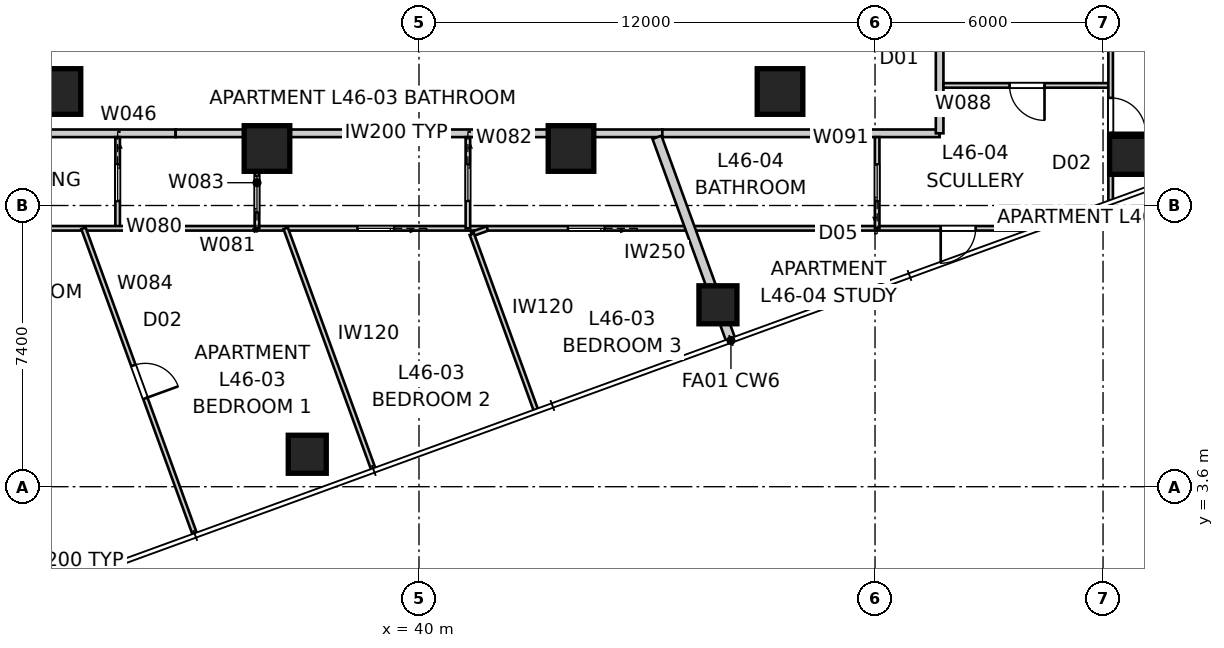
"""IFC4 building model, lengths in metres.
Left out: names, types, materials, properties, quantities, classifications, styles, units other than length and angle.
Written with IfcOpenShell. Run it as: python <this file> out.ifc"""

import sys

from ifc_helpers import new_model, si_unit, direction, frame, frame_2d, origin, origin_2d, place, context, subcontext, project, spatial, rectangle, extrude, element, fill, save


model = new_model("IFC4")
c1 = context("Model", 3, precision=1e-05, world=origin(), true_north=direction((0.0, 1.0)))
c2 = subcontext(c1, "Body", "Model", "MODEL_VIEW")
j1 = project(units=[si_unit("LENGTHUNIT", "METRE"), si_unit("PLANEANGLEUNIT", "RADIAN")], contexts=[c1])
p1 = place(None, origin())
s1 = spatial("IfcSite", under=j1, at=p1, CompositionType="ELEMENT")
p2 = place(p1, origin())
s2 = spatial("IfcBuilding", under=s1, at=p2, CompositionType="ELEMENT")
p3 = place(p2, frame((0.0, 0.0, 167.6)))
s3 = spatial("IfcBuildingStorey", under=s2, at=p3, CompositionType="ELEMENT", Elevation=167.6)
for number, where, z_axis, x_axis in (
    (1, (37.06, 4.454, 0.0), (0.0, 0.0, 1.0), (1.0, 0.0, 0.0)),
    (2, (47.866, 8.387, 0.0), (0.0, 0.0, 1.0), (1.0, 0.0, 0.0)),
    (3, (58.673, 12.32, 0.0), (0.0, 0.0, 1.0), (1.0, 0.0, 0.0)),
):
    element("IfcColumn", number, at=place(p3, frame(where, z_axis=z_axis, x_axis=x_axis)), inside=s3, PredefinedType="COLUMN", context=c2, shape_type="SweptSolid", body=[
        extrude(rectangle(XDim=1.0, YDim=1.0, at=origin_2d()), origin(), (0.0, 0.0, 1.0), 3.2),
    ])
for number, where, z_axis, x_axis in (
    (4, (30.5, 14.0, 0.0), (0.0, 0.0, 1.0), (1.0, 0.0, 0.0)),
    (5, (36.0, 12.5, 0.0), (0.0, 0.0, 1.0), (1.0, 0.0, 0.0)),
    (6, (44.0, 12.5, 0.0), (0.0, 0.0, 1.0), (1.0, 0.0, 0.0)),
    (7, (49.5, 14.0, 0.0), (0.0, 0.0, 1.0), (1.0, 0.0, 0.0)),
):
    element("IfcColumn", number, at=place(p3, frame(where, z_axis=z_axis, x_axis=x_axis)), inside=s3, PredefinedType="COLUMN", context=c2, shape_type="SweptSolid", body=[
        extrude(rectangle(XDim=1.2, YDim=1.2, at=origin_2d()), origin(), (0.0, 0.0, 1.0), 3.4),
    ])
p4 = place(p3, frame((25.5, 12.9, 0.0), z_axis=(0.0, 0.0, 1.0), x_axis=(1.0, 0.0, 0.0)))
e8 = element("IfcWall", 8, at=p4, inside=s3, PredefinedType="PARTITIONING", context=c2, shape_type="SweptSolid", body=[
    extrude(rectangle(XDim=8.097, YDim=0.2, at=frame_2d((4.048, 0.0))), origin(), (0.0, 0.0, 1.0), 3.2),
])
p5 = place(p4, frame((2.95, 0.0, 0.0)))
e9 = element("IfcOpeningElement", 9, at=p5, cuts=e8, PredefinedType="OPENING", context=c2, shape_type="SweptSolid", body=[
    extrude(rectangle(XDim=1.02, YDim=2.34, at=frame_2d((0.51, 1.17))), frame((0.0, 0.11, 0.0), z_axis=(0.0, -1.0, 0.0), x_axis=(1.0, 0.0, 0.0)), (0.0, 0.0, 1.0), 0.22),
])
p6 = place(p3, frame((33.597, 12.9, 0.0), z_axis=(0.0, 0.0, 1.0), x_axis=(1.0, 0.0, 0.0)))
e10 = element("IfcWall", 10, at=p6, inside=s3, PredefinedType="PARTITIONING", context=c2, shape_type="SweptSolid", body=[
    extrude(rectangle(XDim=1.873, YDim=0.2, at=frame_2d((0.937, 0.0))), origin(), (0.0, 0.0, 1.0), 2.2),
])
p7 = place(p3, frame((35.47, 12.9, 0.0), z_axis=(0.0, 0.0, 1.0), x_axis=(1.0, 0.0, 0.0)))
e11 = element("IfcWall", 11, at=p7, inside=s3, PredefinedType="PARTITIONING", context=c2, shape_type="SweptSolid", body=[
    extrude(rectangle(XDim=9.06, YDim=0.2, at=frame_2d((4.53, 0.0))), origin(), (0.0, 0.0, 1.0), 3.2),
])
p8 = place(p3, frame((44.53, 12.9, 0.0), z_axis=(0.0, 0.0, 1.0), x_axis=(1.0, 0.0, 0.0)))
e12 = element("IfcWall", 12, at=p8, inside=s3, PredefinedType="PARTITIONING", context=c2, shape_type="SweptSolid", body=[
    extrude(rectangle(XDim=1.873, YDim=0.2, at=frame_2d((0.937, 0.0))), origin(), (0.0, 0.0, 1.0), 2.2),
])
p9 = place(p3, frame((46.403, 12.9, 0.0), z_axis=(0.0, 0.0, 1.0), x_axis=(1.0, 0.0, 0.0)))
e13 = element("IfcWall", 13, at=p9, inside=s3, PredefinedType="PARTITIONING", context=c2, shape_type="SweptSolid", body=[
    extrude(rectangle(XDim=7.297, YDim=0.2, at=frame_2d((3.648, 0.0))), origin(), (0.0, 0.0, 1.0), 3.2),
])
p10 = place(p3, frame((53.7, 12.9, 0.0), z_axis=(0.0, 0.0, 1.0), x_axis=(0.0, 1.0, 0.0)))
e14 = element("IfcWall", 14, at=p10, inside=s3, PredefinedType="PARTITIONING", context=c2, shape_type="SweptSolid", body=[
    extrude(rectangle(XDim=33.8, YDim=0.2, at=frame_2d((16.9, 0.0))), origin(), (0.0, 0.0, 1.0), 3.2),
])
p11 = place(p10, frame((29.25, 0.0, 0.0)))
e15 = element("IfcOpeningElement", 15, at=p11, cuts=e14, PredefinedType="OPENING", context=c2, shape_type="SweptSolid", body=[
    extrude(rectangle(XDim=1.02, YDim=2.0, at=frame_2d((0.51, 1.0))), frame((0.0, 0.11, 0.0), z_axis=(0.0, -1.0, 0.0), x_axis=(1.0, 0.0, 0.0)), (0.0, 0.0, 1.0), 0.22),
])
p12 = place(p10, frame((2.87, 0.0, 0.0)))
e16 = element("IfcOpeningElement", 16, at=p12, cuts=e14, PredefinedType="OPENING", context=c2, shape_type="SweptSolid", body=[
    extrude(rectangle(XDim=1.02, YDim=2.34, at=frame_2d((0.51, 1.17))), frame((0.0, 0.11, 0.0), z_axis=(0.0, -1.0, 0.0), x_axis=(1.0, 0.0, 0.0)), (0.0, 0.0, 1.0), 0.22),
])
p13 = place(p3, frame((48.208, 7.447, 0.0), z_axis=(0.0, 0.0, 1.0), x_axis=(-0.342004838392, 0.939698191185, 0.0)))
e17 = element("IfcWall", 17, at=p13, inside=s3, PredefinedType="PARTITIONING", context=c2, shape_type="SweptSolid", body=[
    extrude(rectangle(XDim=5.691, YDim=0.25, at=frame_2d((2.845, 0.0))), origin(), (0.0, 0.0, 1.0), 3.2),
])
p14 = place(p3, frame((32.071, 12.8, 0.0), z_axis=(0.0, 0.0, 1.0), x_axis=(0.0, -1.0, 0.0)))
e18 = element("IfcWall", 18, at=p14, inside=s3, PredefinedType="PARTITIONING", context=c2, shape_type="SweptSolid", body=[
    extrude(rectangle(XDim=2.4, YDim=0.12, at=frame_2d((1.2, 0.0))), origin(), (0.0, 0.0, 1.0), 3.2),
])
p15 = place(p14, frame((0.72, 0.0, 0.0)))
e19 = element("IfcOpeningElement", 19, at=p15, cuts=e18, PredefinedType="OPENING", context=c2, shape_type="SweptSolid", body=[
    extrude(rectangle(XDim=0.96, YDim=2.1, at=frame_2d((0.48, 1.05))), frame((0.0, 0.07, 0.0), z_axis=(0.0, -1.0, 0.0), x_axis=(1.0, 0.0, 0.0)), (0.0, 0.0, 1.0), 0.14),
])
p16 = place(p3, frame((56.281, 10.4, 0.0), z_axis=(0.0, 0.0, 1.0), x_axis=(-1.0, 0.0, 0.0)))
e20 = element("IfcWall", 20, at=p16, inside=s3, PredefinedType="PARTITIONING", context=c2, shape_type="SweptSolid", body=[
    extrude(rectangle(XDim=34.647, YDim=0.12, at=frame_2d((17.324, 0.0))), origin(), (0.0, 0.0, 1.0), 3.2),
])
p17 = place(p16, frame((29.309, 0.0, 0.0)))
e21 = element("IfcOpeningElement", 21, at=p17, cuts=e20, PredefinedType="OPENING", context=c2, shape_type="SweptSolid", body=[
    extrude(rectangle(XDim=0.92, YDim=2.34, at=frame_2d((0.46, 1.17))), frame((0.0, 0.07, 0.0), z_axis=(0.0, -1.0, 0.0), x_axis=(1.0, 0.0, 0.0)), (0.0, 0.0, 1.0), 0.14),
])
p18 = place(p16, frame((1.632, 0.0, 0.0)))
e22 = element("IfcOpeningElement", 22, at=p18, cuts=e20, PredefinedType="OPENING", context=c2, shape_type="SweptSolid", body=[
    extrude(rectangle(XDim=0.92, YDim=2.1, at=frame_2d((0.46, 1.05))), frame((0.0, 0.07, 0.0), z_axis=(0.0, -1.0, 0.0), x_axis=(1.0, 0.0, 0.0)), (0.0, 0.0, 1.0), 0.14),
])
p19 = place(p16, frame((16.938, 0.0, 0.0)))
e23 = element("IfcOpeningElement", 23, at=p19, cuts=e20, PredefinedType="OPENING", context=c2, shape_type="SweptSolid", body=[
    extrude(rectangle(XDim=0.96, YDim=2.1, at=frame_2d((0.48, 1.05))), frame((0.0, 0.07, 0.0), z_axis=(0.0, -1.0, 0.0), x_axis=(1.0, 0.0, 0.0)), (0.0, 0.0, 1.0), 0.14),
])
p20 = place(p16, frame((11.4, 0.0, 0.0)))
e24 = element("IfcOpeningElement", 24, at=p20, cuts=e20, PredefinedType="OPENING", context=c2, shape_type="SweptSolid", body=[
    extrude(rectangle(XDim=0.96, YDim=2.1, at=frame_2d((0.48, 1.05))), frame((0.0, 0.07, 0.0), z_axis=(0.0, -1.0, 0.0), x_axis=(1.0, 0.0, 0.0)), (0.0, 0.0, 1.0), 0.14),
])
p21 = place(p3, frame((41.287, 12.8, 0.0), z_axis=(0.0, 0.0, 1.0), x_axis=(0.0, -1.0, 0.0)))
e25 = element("IfcWall", 25, at=p21, inside=s3, PredefinedType="PARTITIONING", context=c2, shape_type="SweptSolid", body=[
    extrude(rectangle(XDim=2.4, YDim=0.12, at=frame_2d((1.2, 0.0))), origin(), (0.0, 0.0, 1.0), 3.2),
])
p22 = place(p21, frame((0.72, 0.0, 0.0)))
e26 = element("IfcOpeningElement", 26, at=p22, cuts=e25, PredefinedType="OPENING", context=c2, shape_type="SweptSolid", body=[
    extrude(rectangle(XDim=0.96, YDim=2.1, at=frame_2d((0.48, 1.05))), frame((0.0, 0.07, 0.0), z_axis=(0.0, -1.0, 0.0), x_axis=(1.0, 0.0, 0.0)), (0.0, 0.0, 1.0), 0.14),
])
p23 = place(p3, frame((35.737, 10.4, 0.0), z_axis=(0.0, 0.0, 1.0), x_axis=(0.0, 1.0, 0.0)))
e27 = element("IfcWall", 27, at=p23, inside=s3, PredefinedType="PARTITIONING", context=c2, shape_type="SweptSolid", body=[
    extrude(rectangle(XDim=2.4, YDim=0.12, at=frame_2d((1.2, 0.0))), origin(), (0.0, 0.0, 1.0), 3.2),
])
p24 = place(p23, frame((0.42, 0.0, 0.0)))
e28 = element("IfcOpeningElement", 28, at=p24, cuts=e27, PredefinedType="OPENING", context=c2, shape_type="SweptSolid", body=[
    extrude(rectangle(XDim=0.96, YDim=2.1, at=frame_2d((0.48, 1.05))), frame((0.0, 0.07, 0.0), z_axis=(0.0, -1.0, 0.0), x_axis=(1.0, 0.0, 0.0)), (0.0, 0.0, 1.0), 0.14),
])
p25 = place(p3, frame((31.171, 10.4, 0.0), z_axis=(0.0, 0.0, 1.0), x_axis=(0.34202238111, -0.939691806296, 0.0)))
e29 = element("IfcWall", 29, at=p25, inside=s3, PredefinedType="PARTITIONING", context=c2, shape_type="SweptSolid", body=[
    extrude(rectangle(XDim=8.562, YDim=0.12, at=frame_2d((4.281, 0.0))), origin(), (0.0, 0.0, 1.0), 3.2),
])
p26 = place(p25, frame((3.841, 0.0, 0.0)))
e30 = element("IfcOpeningElement", 30, at=p26, cuts=e29, PredefinedType="OPENING", context=c2, shape_type="SweptSolid", body=[
    extrude(rectangle(XDim=0.92, YDim=2.34, at=frame_2d((0.46, 1.17))), frame((0.0, 0.07, 0.0), z_axis=(0.0, -1.0, 0.0), x_axis=(1.0, 0.0, 0.0)), (0.0, 0.0, 1.0), 0.14),
])
p27 = place(p3, frame((36.492, 10.4, 0.0), z_axis=(0.0, 0.0, 1.0), x_axis=(0.342030900012, -0.939688705602, 0.0)))
e31 = element("IfcWall", 31, at=p27, inside=s3, PredefinedType="PARTITIONING", context=c2, shape_type="SweptSolid", body=[
    extrude(rectangle(XDim=6.742, YDim=0.12, at=frame_2d((3.371, 0.0))), origin(), (0.0, 0.0, 1.0), 2.588),
])
p28 = place(p3, frame((41.799, 10.395, 0.0), z_axis=(0.0, 0.0, 1.0), x_axis=(-0.939678576029, -0.342058728513, 0.0)))
e32 = element("IfcWall", 32, at=p28, inside=s3, PredefinedType="PARTITIONING", context=c2, shape_type="SweptSolid", body=[
    extrude(rectangle(XDim=0.435, YDim=0.12, at=frame_2d((0.217, 0.0))), origin(), (0.0, 0.0, 1.0), 3.2),
])
p29 = place(p3, frame((41.39, 10.246, 0.0), z_axis=(0.0, 0.0, 1.0), x_axis=(0.342017860496, -0.939693451665, 0.0)))
e33 = element("IfcWall", 33, at=p29, inside=s3, PredefinedType="PARTITIONING", context=c2, shape_type="SweptSolid", body=[
    extrude(rectangle(XDim=4.922, YDim=0.12, at=frame_2d((2.461, 0.0))), origin(), (0.0, 0.0, 1.0), 3.2),
])
p30 = place(p3, frame((58.2, 14.16, 0.0), z_axis=(0.0, 0.0, 1.0), x_axis=(-1.0, 0.0, 0.0)))
e34 = element("IfcWall", 34, at=p30, inside=s3, PredefinedType="PARTITIONING", context=c2, shape_type="SweptSolid", body=[
    extrude(rectangle(XDim=4.4, YDim=0.12, at=frame_2d((2.2, 0.0))), origin(), (0.0, 0.0, 1.0), 3.2),
])
p31 = place(p30, frame((1.74, 0.0, 0.0)))
e35 = element("IfcOpeningElement", 35, at=p31, cuts=e34, PredefinedType="OPENING", context=c2, shape_type="SweptSolid", body=[
    extrude(rectangle(XDim=0.92, YDim=2.34, at=frame_2d((0.46, 1.17))), frame((0.0, 0.07, 0.0), z_axis=(0.0, -1.0, 0.0), x_axis=(1.0, 0.0, 0.0)), (0.0, 0.0, 1.0), 0.14),
])
p32 = place(p3, frame((58.2, 47.266, 0.0), z_axis=(0.0, 0.0, 1.0), x_axis=(0.0, -1.0, 0.0)))
e36 = element("IfcWall", 36, at=p32, inside=s3, PredefinedType="PARTITIONING", context=c2, shape_type="SweptSolid", body=[
    extrude(rectangle(XDim=36.14, YDim=0.12, at=frame_2d((18.07, 0.0))), origin(), (0.0, 0.0, 1.0), 3.2),
])
p33 = place(p32, frame((2.227, 0.0, 0.0)))
e37 = element("IfcOpeningElement", 37, at=p33, cuts=e36, PredefinedType="OPENING", context=c2, shape_type="SweptSolid", body=[
    extrude(rectangle(XDim=0.92, YDim=2.34, at=frame_2d((0.46, 1.17))), frame((0.0, 0.07, 0.0), z_axis=(0.0, -1.0, 0.0), x_axis=(1.0, 0.0, 0.0)), (0.0, 0.0, 1.0), 0.14),
])
p34 = place(p32, frame((5.95, 0.0, 0.0)))
e38 = element("IfcOpeningElement", 38, at=p34, cuts=e36, PredefinedType="OPENING", context=c2, shape_type="SweptSolid", body=[
    extrude(rectangle(XDim=0.92, YDim=2.34, at=frame_2d((0.46, 1.17))), frame((0.0, 0.07, 0.0), z_axis=(0.0, -1.0, 0.0), x_axis=(1.0, 0.0, 0.0)), (0.0, 0.0, 1.0), 0.14),
])
p35 = place(p32, frame((29.769, 0.0, 0.0)))
e39 = element("IfcOpeningElement", 39, at=p35, cuts=e36, PredefinedType="OPENING", context=c2, shape_type="SweptSolid", body=[
    extrude(rectangle(XDim=0.92, YDim=2.34, at=frame_2d((0.46, 1.17))), frame((0.0, 0.07, 0.0), z_axis=(0.0, -1.0, 0.0), x_axis=(1.0, 0.0, 0.0)), (0.0, 0.0, 1.0), 0.14),
])
p36 = place(p32, frame((14.168, 0.0, 0.0)))
e40 = element("IfcOpeningElement", 40, at=p36, cuts=e36, PredefinedType="OPENING", context=c2, shape_type="SweptSolid", body=[
    extrude(rectangle(XDim=0.92, YDim=2.34, at=frame_2d((0.46, 1.17))), frame((0.0, 0.07, 0.0), z_axis=(0.0, -1.0, 0.0), x_axis=(1.0, 0.0, 0.0)), (0.0, 0.0, 1.0), 0.14),
])
p37 = place(p32, frame((33.434, 0.0, 0.0)))
e41 = element("IfcOpeningElement", 41, at=p37, cuts=e36, PredefinedType="OPENING", context=c2, shape_type="SweptSolid", body=[
    extrude(rectangle(XDim=0.92, YDim=2.34, at=frame_2d((0.46, 1.17))), frame((0.0, 0.07, 0.0), z_axis=(0.0, -1.0, 0.0), x_axis=(1.0, 0.0, 0.0)), (0.0, 0.0, 1.0), 0.14),
])
p38 = place(p3, frame((52.056, 10.4, 0.0), z_axis=(0.0, 0.0, 1.0), x_axis=(0.0, 1.0, 0.0)))
e42 = element("IfcWall", 42, at=p38, inside=s3, PredefinedType="PARTITIONING", context=c2, shape_type="SweptSolid", body=[
    extrude(rectangle(XDim=2.4, YDim=0.12, at=frame_2d((1.2, 0.0))), origin(), (0.0, 0.0, 1.0), 3.2),
])
p39 = place(p38, frame((0.72, 0.0, 0.0)))
e43 = element("IfcOpeningElement", 43, at=p39, cuts=e42, PredefinedType="OPENING", context=c2, shape_type="SweptSolid", body=[
    extrude(rectangle(XDim=0.96, YDim=2.1, at=frame_2d((0.48, 1.05))), frame((0.0, 0.07, 0.0), z_axis=(0.0, -1.0, 0.0), x_axis=(1.0, 0.0, 0.0)), (0.0, 0.0, 1.0), 0.14),
])
p40 = place(p15, origin())
e44 = element("IfcDoor", 44, at=p40, inside=s3, OperationType="SLIDING_TO_LEFT", PredefinedType="DOOR", context=c2, shape_type="SweptSolid", body=[
    extrude(rectangle(XDim=0.96, YDim=2.1, at=frame_2d((0.48, 1.05))), frame((0.0, 0.025, 0.0), z_axis=(0.0, -1.0, 0.0), x_axis=(1.0, 0.0, 0.0)), (0.0, 0.0, 1.0), 0.05),
])
fill(e19, e44)
p41 = place(p31, origin())
e45 = element("IfcDoor", 45, at=p41, inside=s3, OperationType="SINGLE_SWING_LEFT", PredefinedType="DOOR", context=c2, shape_type="SweptSolid", body=[
    extrude(rectangle(XDim=0.92, YDim=2.34, at=frame_2d((0.46, 1.17))), frame((0.0, 0.025, 0.0), z_axis=(0.0, -1.0, 0.0), x_axis=(1.0, 0.0, 0.0)), (0.0, 0.0, 1.0), 0.05),
])
fill(e35, e45)
p42 = place(p26, origin())
e46 = element("IfcDoor", 46, at=p42, inside=s3, OperationType="SINGLE_SWING_RIGHT", PredefinedType="DOOR", context=c2, shape_type="SweptSolid", body=[
    extrude(rectangle(XDim=0.92, YDim=2.34, at=frame_2d((0.46, 1.17))), frame((0.0, 0.025, 0.0), z_axis=(0.0, -1.0, 0.0), x_axis=(1.0, 0.0, 0.0)), (0.0, 0.0, 1.0), 0.05),
])
fill(e30, e46)
p43 = place(p24, origin())
e47 = element("IfcDoor", 47, at=p43, inside=s3, OperationType="SLIDING_TO_LEFT", PredefinedType="DOOR", context=c2, shape_type="SweptSolid", body=[
    extrude(rectangle(XDim=0.96, YDim=2.1, at=frame_2d((0.48, 1.05))), frame((0.0, 0.025, 0.0), z_axis=(0.0, -1.0, 0.0), x_axis=(1.0, 0.0, 0.0)), (0.0, 0.0, 1.0), 0.05),
])
fill(e28, e47)
p44 = place(p18, origin())
e48 = element("IfcDoor", 48, at=p44, inside=s3, OperationType="SINGLE_SWING_RIGHT", PredefinedType="DOOR", context=c2, shape_type="SweptSolid", body=[
    extrude(rectangle(XDim=0.92, YDim=2.1, at=frame_2d((0.46, 1.05))), frame((0.0, 0.025, 0.0), z_axis=(0.0, -1.0, 0.0), x_axis=(1.0, 0.0, 0.0)), (0.0, 0.0, 1.0), 0.05),
])
fill(e22, e48)
p45 = place(p37, origin())
e49 = element("IfcDoor", 49, at=p45, inside=s3, OperationType="SINGLE_SWING_RIGHT", PredefinedType="DOOR", context=c2, shape_type="SweptSolid", body=[
    extrude(rectangle(XDim=0.92, YDim=2.34, at=frame_2d((0.46, 1.17))), frame((0.0, 0.025, 0.0), z_axis=(0.0, -1.0, 0.0), x_axis=(1.0, 0.0, 0.0)), (0.0, 0.0, 1.0), 0.05),
])
fill(e41, e49)
p46 = place(p39, origin())
e50 = element("IfcDoor", 50, at=p46, inside=s3, OperationType="SLIDING_TO_LEFT", PredefinedType="DOOR", context=c2, shape_type="SweptSolid", body=[
    extrude(rectangle(XDim=0.96, YDim=2.1, at=frame_2d((0.48, 1.05))), frame((0.0, 0.025, 0.0), z_axis=(0.0, -1.0, 0.0), x_axis=(1.0, 0.0, 0.0)), (0.0, 0.0, 1.0), 0.05),
])
fill(e43, e50)
p47 = place(p19, origin())
e51 = element("IfcDoor", 51, at=p47, inside=s3, OperationType="SLIDING_TO_LEFT", PredefinedType="DOOR", context=c2, shape_type="SweptSolid", body=[
    extrude(rectangle(XDim=0.96, YDim=2.1, at=frame_2d((0.48, 1.05))), frame((0.0, 0.025, 0.0), z_axis=(0.0, -1.0, 0.0), x_axis=(1.0, 0.0, 0.0)), (0.0, 0.0, 1.0), 0.05),
])
fill(e23, e51)
p48 = place(p22, origin())
e52 = element("IfcDoor", 52, at=p48, inside=s3, OperationType="SLIDING_TO_LEFT", PredefinedType="DOOR", context=c2, shape_type="SweptSolid", body=[
    extrude(rectangle(XDim=0.96, YDim=2.1, at=frame_2d((0.48, 1.05))), frame((0.0, 0.025, 0.0), z_axis=(0.0, -1.0, 0.0), x_axis=(1.0, 0.0, 0.0)), (0.0, 0.0, 1.0), 0.05),
])
fill(e26, e52)
p49 = place(p20, origin())
e53 = element("IfcDoor", 53, at=p49, inside=s3, OperationType="SLIDING_TO_LEFT", PredefinedType="DOOR", context=c2, shape_type="SweptSolid", body=[
    extrude(rectangle(XDim=0.96, YDim=2.1, at=frame_2d((0.48, 1.05))), frame((0.0, 0.025, 0.0), z_axis=(0.0, -1.0, 0.0), x_axis=(1.0, 0.0, 0.0)), (0.0, 0.0, 1.0), 0.05),
])
fill(e24, e53)
save(model, sys.argv[1])
